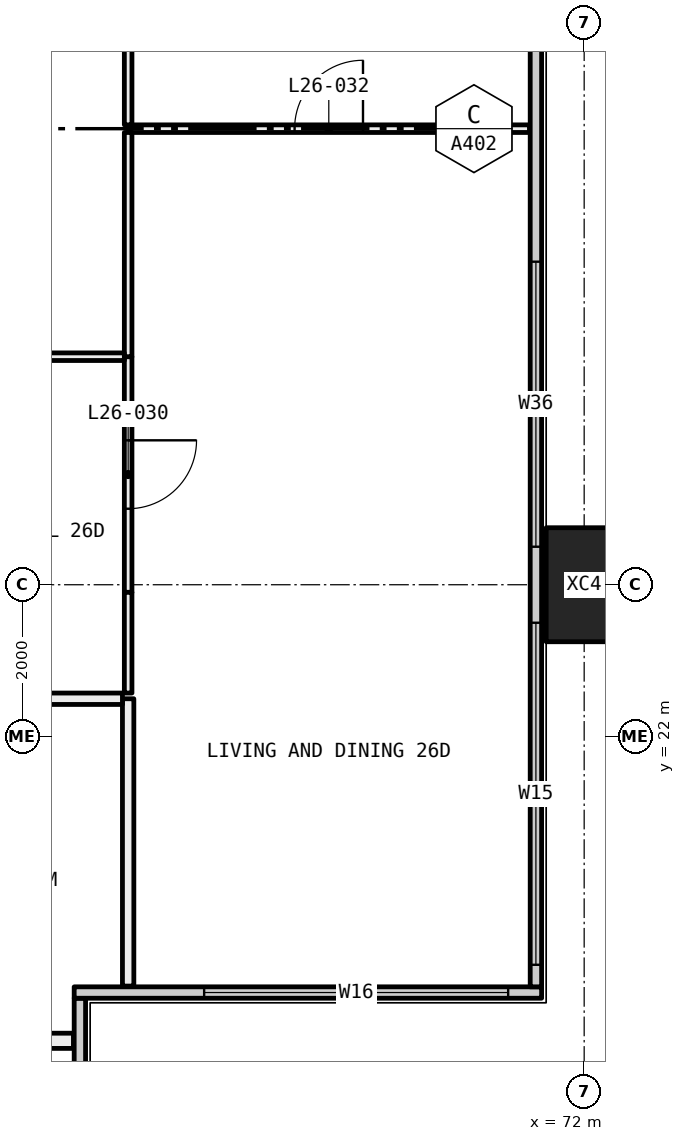
"""IFC4 building model, lengths in metres.
Left out: names, types, materials, properties, quantities, classifications, styles, units other than length and angle.
Written with IfcOpenShell. Run it as: python <this file> out.ifc"""

import sys

from ifc_helpers import new_model, si_unit, direction, frame, frame_2d, origin, origin_2d, place, context, subcontext, project, spatial, rectangle, hollow_rectangle, extrude, element, fill, save


model = new_model("IFC4")
c1 = context("Model", 3, precision=1e-05, world=origin(), true_north=direction((0.0, 1.0)))
c2 = subcontext(c1, "Body", "Model", "MODEL_VIEW")
j1 = project(units=[si_unit("LENGTHUNIT", "METRE"), si_unit("PLANEANGLEUNIT", "RADIAN")], contexts=[c1])
p1 = place(None, origin())
s1 = spatial("IfcSite", under=j1, at=p1, CompositionType="ELEMENT")
p2 = place(p1, origin())
s2 = spatial("IfcBuilding", under=s1, at=p2, CompositionType="ELEMENT")
p3 = place(p2, frame((0.0, 0.0, 103.5)))
s3 = spatial("IfcBuildingStorey", under=s2, at=p3, CompositionType="ELEMENT", Elevation=103.5)
p4 = place(p3, frame((72.0, 24.0, -0.4), z_axis=(0.0, 0.0, 1.0), x_axis=(0.0, 1.0, 0.0)))
e1 = element("IfcColumn", 1, at=p4, inside=s3, PredefinedType="COLUMN", context=c2, shape_type="SweptSolid", body=[
    extrude(hollow_rectangle(XDim=1.5, YDim=1.0, WallThickness=0.06, at=origin_2d()), origin(), (0.0, 0.0, 1.0), 3.45),
])
p5 = place(p3, frame((65.365, 12.71, 0.0), z_axis=(0.0, 0.0, 1.0), x_axis=(0.0, 1.0, 0.0)))
e2 = element("IfcWall", 2, at=p5, inside=s3, PredefinedType="ELEMENTEDWALL", context=c2, shape_type="SweptSolid", body=[
    extrude(rectangle(XDim=5.85, YDim=0.15, at=frame_2d((2.925, 0.0))), origin(), (0.0, 0.0, 1.0), 3.05),
])
p6 = place(p5, frame((0.29, 0.0, 0.45)))
e3 = element("IfcOpeningElement", 3, at=p6, cuts=e2, PredefinedType="OPENING", context=c2, shape_type="SweptSolid", body=[
    extrude(rectangle(XDim=4.0, YDim=2.55, at=frame_2d((2.0, 1.275))), frame((0.0, 0.085, 0.0), z_axis=(0.0, -1.0, 0.0), x_axis=(1.0, 0.0, 0.0)), (0.0, 0.0, 1.0), 0.17),
])
p7 = place(p3, frame((65.29, 18.635, 0.0), z_axis=(0.0, 0.0, 1.0), x_axis=(1.0, 0.0, 0.0)))
e4 = element("IfcWall", 4, at=p7, inside=s3, PredefinedType="ELEMENTEDWALL", context=c2, shape_type="SweptSolid", body=[
    extrude(rectangle(XDim=6.15, YDim=0.15, at=frame_2d((3.075, 0.0))), origin(), (0.0, 0.0, 1.0), 3.05),
])
p8 = place(p7, frame((1.71, 0.0, 0.45)))
e5 = element("IfcOpeningElement", 5, at=p8, cuts=e4, PredefinedType="OPENING", context=c2, shape_type="SweptSolid", body=[
    extrude(rectangle(XDim=4.0, YDim=2.55, at=frame_2d((2.0, 1.275))), frame((0.0, 0.085, 0.0), z_axis=(0.0, -1.0, 0.0), x_axis=(1.0, 0.0, 0.0)), (0.0, 0.0, 1.0), 0.17),
])
p9 = place(p3, frame((71.365, 18.71, 0.0), z_axis=(0.0, 0.0, 1.0), x_axis=(0.0, 1.0, 0.0)))
e6 = element("IfcWall", 6, at=p9, inside=s3, PredefinedType="ELEMENTEDWALL", context=c2, shape_type="SweptSolid", body=[
    extrude(rectangle(XDim=22.58, YDim=0.15, at=frame_2d((11.29, 0.0))), origin(), (0.0, 0.0, 1.0), 3.05),
])
p10 = place(p9, frame((0.29, 0.0, 0.45)))
e7 = element("IfcOpeningElement", 7, at=p10, cuts=e6, PredefinedType="OPENING", context=c2, shape_type="SweptSolid", body=[
    extrude(rectangle(XDim=4.5, YDim=2.55, at=frame_2d((2.25, 1.275))), frame((0.0, 0.085, 0.0), z_axis=(0.0, -1.0, 0.0), x_axis=(1.0, 0.0, 0.0)), (0.0, 0.0, 1.0), 0.17),
])
p11 = place(p9, frame((5.79, 0.0, 0.45)))
e8 = element("IfcOpeningElement", 8, at=p11, cuts=e6, PredefinedType="OPENING", context=c2, shape_type="SweptSolid", body=[
    extrude(rectangle(XDim=3.75, YDim=2.55, at=frame_2d((1.875, 1.275))), frame((0.0, 0.085, 0.0), z_axis=(0.0, -1.0, 0.0), x_axis=(1.0, 0.0, 0.0)), (0.0, 0.0, 1.0), 0.17),
])
p12 = place(p9, frame((13.04, 0.0, 0.45)))
e9 = element("IfcOpeningElement", 9, at=p12, cuts=e6, PredefinedType="OPENING", context=c2, shape_type="SweptSolid", body=[
    extrude(rectangle(XDim=0.75, YDim=2.55, at=frame_2d((0.375, 1.275))), frame((0.0, 0.085, 0.0), z_axis=(0.0, -1.0, 0.0), x_axis=(1.0, 0.0, 0.0)), (0.0, 0.0, 1.0), 0.17),
])
p13 = place(p9, frame((14.79, 0.0, 0.45)))
e10 = element("IfcOpeningElement", 10, at=p13, cuts=e6, PredefinedType="OPENING", context=c2, shape_type="SweptSolid", body=[
    extrude(rectangle(XDim=2.0, YDim=2.55, at=frame_2d((1.0, 1.275))), frame((0.0, 0.085, 0.0), z_axis=(0.0, -1.0, 0.0), x_axis=(1.0, 0.0, 0.0)), (0.0, 0.0, 1.0), 0.17),
])
p14 = place(p9, frame((17.79, 0.0, 0.45)))
e11 = element("IfcOpeningElement", 11, at=p14, cuts=e6, PredefinedType="OPENING", context=c2, shape_type="SweptSolid", body=[
    extrude(rectangle(XDim=4.5, YDim=2.55, at=frame_2d((2.25, 1.275))), frame((0.0, 0.085, 0.0), z_axis=(0.0, -1.0, 0.0), x_axis=(1.0, 0.0, 0.0)), (0.0, 0.0, 1.0), 0.17),
])
p15 = place(p3, frame((65.28, 18.0, 0.0), z_axis=(0.0, 0.0, 1.0), x_axis=(-1.0, 0.0, 0.0)))
e12 = element("IfcWall", 12, at=p15, inside=s3, PredefinedType="PARTITIONING", context=c2, shape_type="SweptSolid", body=[
    extrude(rectangle(XDim=3.38, YDim=0.2, at=frame_2d((1.69, 0.0))), origin(), (0.0, 0.0, 1.0), 3.05),
])
p16 = place(p3, frame((71.28, 30.0, 0.0), z_axis=(0.0, 0.0, 1.0), x_axis=(-1.0, 0.0, 0.0)))
e13 = element("IfcWall", 13, at=p16, inside=s3, PredefinedType="PARTITIONING", context=c2, shape_type="SweptSolid", body=[
    extrude(rectangle(XDim=5.28, YDim=0.1, at=frame_2d((2.64, 0.0))), origin(), (0.0, 0.0, 1.0), 3.05),
])
p17 = place(p16, frame((2.19, 0.0, 0.0)))
e14 = element("IfcOpeningElement", 14, at=p17, cuts=e13, PredefinedType="OPENING", context=c2, shape_type="SweptSolid", body=[
    extrude(rectangle(XDim=0.9, YDim=2.1, at=frame_2d((0.45, 1.05))), frame((0.0, 0.06, 0.0), z_axis=(0.0, -1.0, 0.0), x_axis=(1.0, 0.0, 0.0)), (0.0, 0.0, 1.0), 0.12),
])
p18 = place(p3, frame((66.0, 22.5, 0.0), z_axis=(0.0, 0.0, 1.0), x_axis=(0.0, -1.0, 0.0)))
e15 = element("IfcWall", 15, at=p18, inside=s3, PredefinedType="PARTITIONING", context=c2, shape_type="SweptSolid", body=[
    extrude(rectangle(XDim=3.78, YDim=0.15, at=frame_2d((1.89, 0.0))), origin(), (0.0, 0.0, 1.0), 3.05),
])
p19 = place(p3, frame((66.0, 27.0, 0.0), z_axis=(0.0, 0.0, 1.0), x_axis=(0.0, -1.0, 0.0)))
e16 = element("IfcWall", 16, at=p19, inside=s3, PredefinedType="PARTITIONING", context=c2, shape_type="SweptSolid", body=[
    extrude(rectangle(XDim=3.1, YDim=0.1, at=frame_2d((1.55, 0.0))), origin(), (0.0, 0.0, 1.0), 2.45),
])
p20 = place(p19, frame((1.1, 0.0, 0.0)))
e17 = element("IfcOpeningElement", 17, at=p20, cuts=e16, PredefinedType="OPENING", context=c2, shape_type="SweptSolid", body=[
    extrude(rectangle(XDim=0.9, YDim=2.1, at=frame_2d((0.45, 1.05))), frame((0.0, 0.06, 0.0), z_axis=(0.0, -1.0, 0.0), x_axis=(1.0, 0.0, 0.0)), (0.0, 0.0, 1.0), 0.12),
])
p21 = place(p3, frame((66.0, 23.9, 0.0), z_axis=(0.0, 0.0, 1.0), x_axis=(0.0, -1.0, 0.0)))
e18 = element("IfcWall", 18, at=p21, inside=s3, PredefinedType="PARTITIONING", context=c2, shape_type="SweptSolid", body=[
    extrude(rectangle(XDim=1.325, YDim=0.1, at=frame_2d((0.663, 0.0))), origin(), (0.0, 0.0, 1.0), 3.05),
])
p22 = place(p3, frame((66.0, 29.95, 0.0), z_axis=(0.0, 0.0, 1.0), x_axis=(0.0, -1.0, 0.0)))
e19 = element("IfcWall", 19, at=p22, inside=s3, PredefinedType="PARTITIONING", context=c2, shape_type="SweptSolid", body=[
    extrude(rectangle(XDim=2.95, YDim=0.1, at=frame_2d((1.475, 0.0))), origin(), (0.0, 0.0, 1.0), 3.05),
])
p23 = place(p3, frame((66.0, 35.95, 0.0), z_axis=(0.0, 0.0, 1.0), x_axis=(0.0, -1.0, 0.0)))
e20 = element("IfcWall", 20, at=p23, inside=s3, PredefinedType="PARTITIONING", context=c2, shape_type="SweptSolid", body=[
    extrude(rectangle(XDim=5.9, YDim=0.1, at=frame_2d((2.95, 0.0))), origin(), (0.0, 0.0, 1.0), 2.45),
])
p24 = place(p3, frame((65.925, 22.5, 0.0), z_axis=(0.0, 0.0, 1.0), x_axis=(-1.0, 0.0, 0.0)))
e21 = element("IfcWall", 21, at=p24, inside=s3, PredefinedType="PARTITIONING", context=c2, shape_type="SweptSolid", body=[
    extrude(rectangle(XDim=3.925, YDim=0.15, at=frame_2d((1.962, 0.0))), origin(), (0.0, 0.0, 1.0), 3.05),
])
p25 = place(p24, frame((1.512, 0.0, 0.0)))
e22 = element("IfcOpeningElement", 22, at=p25, cuts=e21, PredefinedType="OPENING", context=c2, shape_type="SweptSolid", body=[
    extrude(rectangle(XDim=0.9, YDim=2.1, at=frame_2d((0.45, 1.05))), frame((0.0, 0.085, 0.0), z_axis=(0.0, -1.0, 0.0), x_axis=(1.0, 0.0, 0.0)), (0.0, 0.0, 1.0), 0.17),
])
p26 = place(p3, frame((65.95, 27.0, 0.0), z_axis=(0.0, 0.0, 1.0), x_axis=(-1.0, 0.0, 0.0)))
e23 = element("IfcWall", 23, at=p26, inside=s3, PredefinedType="PARTITIONING", context=c2, shape_type="SweptSolid", body=[
    extrude(rectangle(XDim=3.95, YDim=0.1, at=frame_2d((1.975, 0.0))), origin(), (0.0, 0.0, 1.0), 3.05),
])
p27 = place(p26, frame((1.525, 0.0, 0.0)))
e24 = element("IfcOpeningElement", 24, at=p27, cuts=e23, PredefinedType="OPENING", context=c2, shape_type="SweptSolid", body=[
    extrude(rectangle(XDim=0.9, YDim=2.1, at=frame_2d((0.45, 1.05))), frame((0.0, 0.06, 0.0), z_axis=(0.0, -1.0, 0.0), x_axis=(1.0, 0.0, 0.0)), (0.0, 0.0, 1.0), 0.12),
])
p28 = place(p8, origin())
e25 = element("IfcWindow", 25, at=p28, inside=s3, PartitioningType="SINGLE_PANEL", PredefinedType="WINDOW", context=c2, shape_type="SweptSolid", body=[
    extrude(rectangle(XDim=4.0, YDim=2.55, at=frame_2d((2.0, 1.275))), frame((0.0, 0.03, 0.0), z_axis=(0.0, -1.0, 0.0), x_axis=(1.0, 0.0, 0.0)), (0.0, 0.0, 1.0), 0.06),
])
fill(e5, e25)
p29 = place(p10, origin())
e26 = element("IfcWindow", 26, at=p29, inside=s3, PartitioningType="SINGLE_PANEL", PredefinedType="WINDOW", context=c2, shape_type="SweptSolid", body=[
    extrude(rectangle(XDim=4.5, YDim=2.55, at=frame_2d((2.25, 1.275))), frame((0.0, 0.03, 0.0), z_axis=(0.0, -1.0, 0.0), x_axis=(1.0, 0.0, 0.0)), (0.0, 0.0, 1.0), 0.06),
])
fill(e7, e26)
p30 = place(p11, origin())
e27 = element("IfcWindow", 27, at=p30, inside=s3, PartitioningType="SINGLE_PANEL", PredefinedType="WINDOW", context=c2, shape_type="SweptSolid", body=[
    extrude(rectangle(XDim=3.75, YDim=2.55, at=frame_2d((1.875, 1.275))), frame((0.0, 0.03, 0.0), z_axis=(0.0, -1.0, 0.0), x_axis=(1.0, 0.0, 0.0)), (0.0, 0.0, 1.0), 0.06),
])
fill(e8, e27)
p31 = place(p20, origin())
e28 = element("IfcDoor", 28, at=p31, inside=s3, OperationType="SINGLE_SWING_RIGHT", PredefinedType="DOOR", context=c2, shape_type="SweptSolid", body=[
    extrude(rectangle(XDim=0.9, YDim=2.1, at=frame_2d((0.45, 1.05))), frame((0.0, 0.025, 0.0), z_axis=(0.0, -1.0, 0.0), x_axis=(1.0, 0.0, 0.0)), (0.0, 0.0, 1.0), 0.05),
])
fill(e17, e28)
p32 = place(p17, frame((0.9, 0.0, 0.0), x_axis=(-1.0, 0.0, 0.0)))
e29 = element("IfcDoor", 29, at=p32, inside=s3, OperationType="SINGLE_SWING_LEFT", PredefinedType="DOOR", context=c2, shape_type="SweptSolid", body=[
    extrude(rectangle(XDim=0.9, YDim=2.1, at=frame_2d((0.45, 1.05))), frame((0.0, 0.025, 0.0), z_axis=(0.0, -1.0, 0.0), x_axis=(1.0, 0.0, 0.0)), (0.0, 0.0, 1.0), 0.05),
])
fill(e14, e29)
save(model, sys.argv[1])
